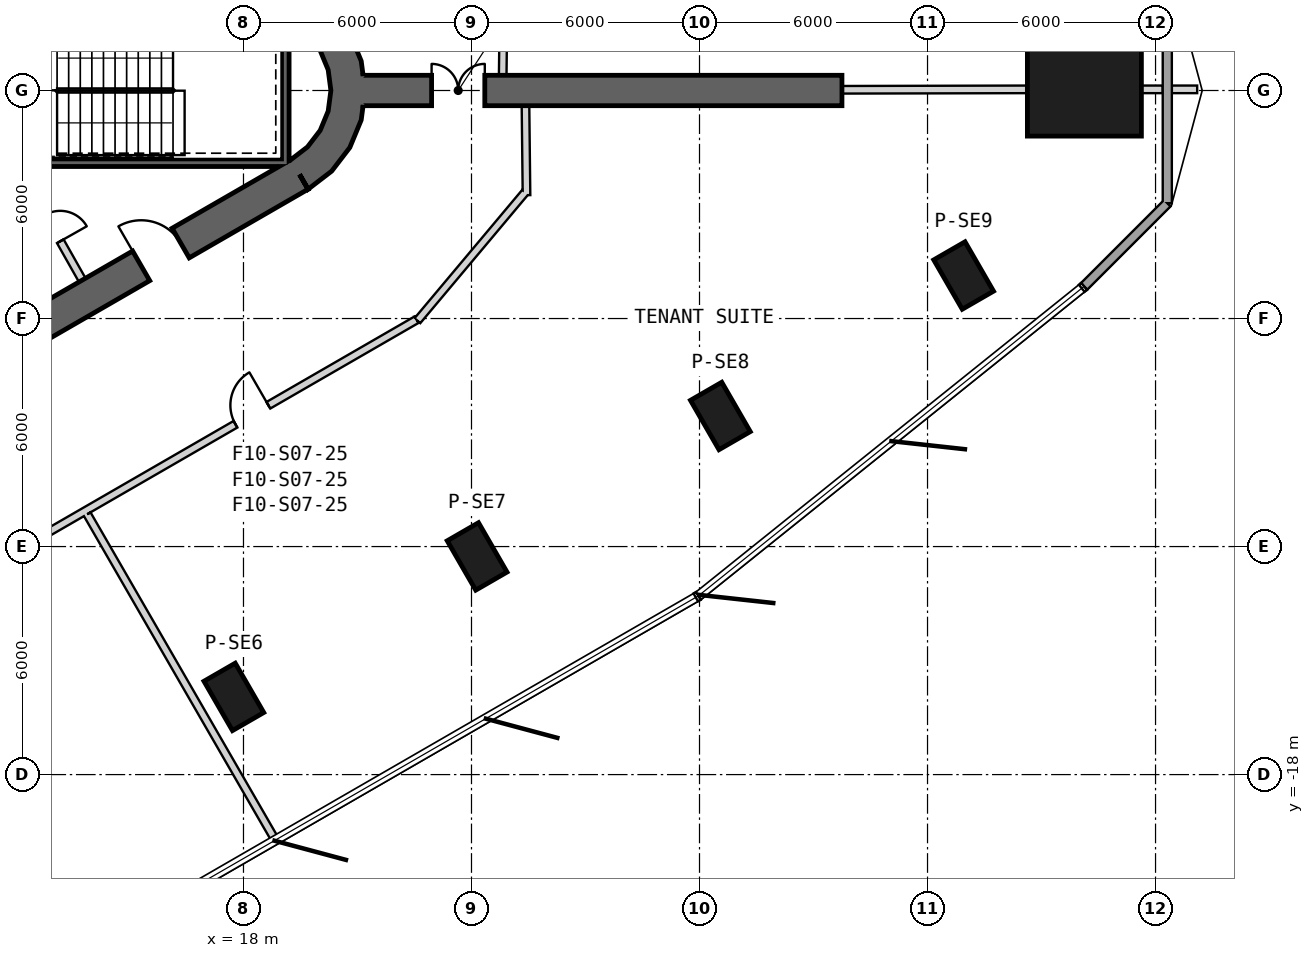
"""IFC4 building model, lengths in metres.
Left out: names, types, materials, properties, quantities, classifications, styles, units other than length and angle.
Written with IfcOpenShell. Run it as: python <this file> out.ifc"""

import sys

from ifc_helpers import new_model, si_unit, direction, frame, frame_2d, origin, origin_2d, place, context, subcontext, project, spatial, polyline, rectangle, outline, extrude, element, fill, save


model = new_model("IFC4")
c1 = context("Model", 3, precision=1e-05, world=origin(), true_north=direction((0.0, 1.0)))
c2 = subcontext(c1, "Body", "Model", "MODEL_VIEW")
j1 = project(units=[si_unit("LENGTHUNIT", "METRE"), si_unit("PLANEANGLEUNIT", "RADIAN")], contexts=[c1])
p1 = place(None, origin())
s1 = spatial("IfcSite", under=j1, at=p1, CompositionType="ELEMENT")
p2 = place(p1, origin())
s2 = spatial("IfcBuilding", under=s1, at=p2, CompositionType="ELEMENT")
p3 = place(p2, frame((0.0, 0.0, 131.6)))
s3 = spatial("IfcBuildingStorey", under=s2, at=p3, CompositionType="ELEMENT", Elevation=131.6)
p4 = place(p3, frame((40.128, 0.0, 0.0), z_axis=(0.0, 0.0, 1.0), x_axis=(1.0, 0.0, 0.0)))
e1 = element("IfcColumn", 1, at=p4, inside=s3, PredefinedType="COLUMN", context=c2, shape_type="SweptSolid", body=[
    extrude(rectangle(XDim=3.0, YDim=2.4, at=origin_2d()), origin(), (0.0, 0.0, 1.0), 4.1),
])
for number, where, z_axis, x_axis in (
    (2, (17.747, -15.956, 0.0), (0.0, 0.0, 1.0), (0.5, -0.866, 0.0)),
    (3, (24.148, -12.26, 0.0), (0.0, 0.0, 1.0), (0.5, -0.866, 0.0)),
    (4, (30.549, -8.564, 0.0), (0.0, 0.0, 1.0), (0.5, -0.866, 0.0)),
    (5, (36.95, -4.868, 0.0), (0.0, 0.0, 1.0), (0.5, -0.866, 0.0)),
):
    element("IfcColumn", number, at=place(p3, frame(where, z_axis=z_axis, x_axis=x_axis)), inside=s3, PredefinedType="COLUMN", context=c2, shape_type="SweptSolid", body=[
        extrude(rectangle(XDim=1.5, YDim=0.95, at=origin_2d()), origin(), (0.0, 0.0, 1.0), 4.1),
    ])
p5 = place(p3, frame((-7.825, -17.97, 0.0), z_axis=(0.0, 0.0, 1.0), x_axis=(0.866028369851, 0.499994862586, 0.0)))
e6 = element("IfcWall", 6, at=p5, inside=s3, PredefinedType="SHEAR", context=c2, shape_type="SweptSolid", body=[
    extrude(rectangle(XDim=31.523, YDim=0.9, at=frame_2d((15.762, 0.0))), origin(), (0.0, 0.0, 1.0), 4.1),
])
p6 = place(p5, frame((7.062, 0.0, 0.0)))
e7 = element("IfcOpeningElement", 7, at=p6, cuts=e6, PredefinedType="OPENING", context=c2, shape_type="SweptSolid", body=[
    extrude(rectangle(XDim=1.2, YDim=2.4, at=frame_2d((0.6, 1.2))), frame((0.0, 0.46, 0.0), z_axis=(0.0, -1.0, 0.0), x_axis=(1.0, 0.0, 0.0)), (0.0, 0.0, 1.0), 0.92),
])
p7 = place(p5, frame((9.762, 0.0, 0.0)))
e8 = element("IfcOpeningElement", 8, at=p7, cuts=e6, PredefinedType="OPENING", context=c2, shape_type="SweptSolid", body=[
    extrude(rectangle(XDim=1.2, YDim=2.4, at=frame_2d((0.6, 1.2))), frame((0.0, 0.46, 0.0), z_axis=(0.0, -1.0, 0.0), x_axis=(1.0, 0.0, 0.0)), (0.0, 0.0, 1.0), 0.92),
])
p8 = place(p5, frame((12.462, 0.0, 0.0)))
e9 = element("IfcOpeningElement", 9, at=p8, cuts=e6, PredefinedType="OPENING", context=c2, shape_type="SweptSolid", body=[
    extrude(rectangle(XDim=1.2, YDim=2.4, at=frame_2d((0.6, 1.2))), frame((0.0, 0.46, 0.0), z_axis=(0.0, -1.0, 0.0), x_axis=(1.0, 0.0, 0.0)), (0.0, 0.0, 1.0), 0.92),
])
p9 = place(p5, frame((15.162, 0.0, 0.0)))
e10 = element("IfcOpeningElement", 10, at=p9, cuts=e6, PredefinedType="OPENING", context=c2, shape_type="SweptSolid", body=[
    extrude(rectangle(XDim=1.2, YDim=2.4, at=frame_2d((0.6, 1.2))), frame((0.0, 0.46, 0.0), z_axis=(0.0, -1.0, 0.0), x_axis=(1.0, 0.0, 0.0)), (0.0, 0.0, 1.0), 0.92),
])
p10 = place(p5, frame((17.862, 0.0, 0.0)))
e11 = element("IfcOpeningElement", 11, at=p10, cuts=e6, PredefinedType="OPENING", context=c2, shape_type="SweptSolid", body=[
    extrude(rectangle(XDim=1.2, YDim=2.4, at=frame_2d((0.6, 1.2))), frame((0.0, 0.46, 0.0), z_axis=(0.0, -1.0, 0.0), x_axis=(1.0, 0.0, 0.0)), (0.0, 0.0, 1.0), 0.92),
])
p11 = place(p5, frame((20.562, 0.0, 0.0)))
e12 = element("IfcOpeningElement", 12, at=p11, cuts=e6, PredefinedType="OPENING", context=c2, shape_type="SweptSolid", body=[
    extrude(rectangle(XDim=1.2, YDim=2.4, at=frame_2d((0.6, 1.2))), frame((0.0, 0.46, 0.0), z_axis=(0.0, -1.0, 0.0), x_axis=(1.0, 0.0, 0.0)), (0.0, 0.0, 1.0), 0.92),
])
p12 = place(p5, frame((26.712, 0.0, 0.0)))
e13 = element("IfcOpeningElement", 13, at=p12, cuts=e6, PredefinedType="OPENING", context=c2, shape_type="SweptSolid", body=[
    extrude(rectangle(XDim=1.2, YDim=2.4, at=frame_2d((0.6, 1.2))), frame((0.0, 0.46, 0.0), z_axis=(0.0, -1.0, 0.0), x_axis=(1.0, 0.0, 0.0)), (0.0, 0.0, 1.0), 0.92),
])
p13 = place(p5, frame((3.612, 0.0, 0.0)))
e14 = element("IfcOpeningElement", 14, at=p13, cuts=e6, PredefinedType="OPENING", context=c2, shape_type="SweptSolid", body=[
    extrude(rectangle(XDim=1.2, YDim=2.4, at=frame_2d((0.6, 1.2))), frame((0.0, 0.46, 0.0), z_axis=(0.0, -1.0, 0.0), x_axis=(1.0, 0.0, 0.0)), (0.0, 0.0, 1.0), 0.92),
])
p14 = place(p3, origin())
e15 = element("IfcWall", 15, at=p14, inside=s3, PredefinedType="SHEAR", context=c2, shape_type="SweptSolid", body=[
    extrude(outline(polyline([(19.7, -2.598), (20.321, -2.121), (20.798, -1.5), (21.098, -0.777), (21.2, 0.0), (21.098, 0.777), (20.798, 1.5), (20.321, 2.121), (19.7, 2.598), (19.25, 1.819), (19.685, 1.485), (20.019, 1.05), (20.229, 0.543), (20.3, 0.0), (20.229, -0.543), (20.019, -1.05), (19.685, -1.485), (19.25, -1.819), (19.7, -2.598)])), origin(), (0.0, 0.0, 1.0), 4.1),
])
p15 = place(p3, frame((21.15, 0.0, 0.0), z_axis=(0.0, 0.0, 1.0), x_axis=(1.0, 0.0, 0.0)))
e16 = element("IfcWall", 16, at=p15, inside=s3, PredefinedType="SHEAR", context=c2, shape_type="SweptSolid", body=[
    extrude(rectangle(XDim=12.598, YDim=0.8, at=frame_2d((6.299, 0.0))), origin(), (0.0, 0.0, 1.0), 4.1),
])
p16 = place(p15, frame((1.8, 0.0, 0.0)))
e17 = element("IfcOpeningElement", 17, at=p16, cuts=e16, PredefinedType="OPENING", context=c2, shape_type="SweptSolid", body=[
    extrude(rectangle(XDim=1.4, YDim=2.4, at=frame_2d((0.7, 1.2))), frame((0.0, 0.41, 0.0), z_axis=(0.0, -1.0, 0.0), x_axis=(1.0, 0.0, 0.0)), (0.0, 0.0, 1.0), 0.82),
])
p17 = place(p3, frame((40.12, -5.154, 0.0), z_axis=(0.0, 0.0, 1.0), x_axis=(0.707146214964, 0.70706734521, 0.0)))
e18 = element("IfcWall", 18, at=p17, inside=s3, PredefinedType="SOLIDWALL", context=c2, shape_type="SweptSolid", body=[
    extrude(rectangle(XDim=3.095, YDim=0.24, at=frame_2d((1.548, 0.0))), origin(), (0.0, 0.0, 1.0), 3.8),
])
p18 = place(p3, frame((42.309, -2.965, 0.0), z_axis=(0.0, 0.0, 1.0), x_axis=(0.0, 1.0, 0.0)))
e19 = element("IfcWall", 19, at=p18, inside=s3, PredefinedType="SOLIDWALL", context=c2, shape_type="SweptSolid", body=[
    extrude(rectangle(XDim=5.931, YDim=0.24, at=frame_2d((2.965, 0.0))), origin(), (0.0, 0.0, 1.0), 3.8),
])
p19 = place(p3, frame((19.1, -2.0, -0.3), z_axis=(0.0, 0.0, 1.0), x_axis=(0.0, 1.0, 0.0)))
e20 = element("IfcWall", 20, at=p19, inside=s3, PredefinedType="SHEAR", context=c2, shape_type="SweptSolid", body=[
    extrude(rectangle(XDim=3.8, YDim=0.2, at=frame_2d((1.9, 0.0))), origin(), (0.0, 0.0, 1.0), 4.1),
])
p20 = place(p3, frame((11.1, -1.9, -0.3), z_axis=(0.0, 0.0, 1.0), x_axis=(1.0, 0.0, 0.0)))
e21 = element("IfcWall", 21, at=p20, inside=s3, PredefinedType="SHEAR", context=c2, shape_type="SweptSolid", body=[
    extrude(rectangle(XDim=7.9, YDim=0.2, at=frame_2d((3.95, 0.0))), origin(), (0.0, 0.0, 1.0), 4.1),
])
p21 = place(p3, frame((13.758, -4.99, 0.0), z_axis=(0.0, 0.0, 1.0), x_axis=(-0.491993409184, 0.87059892334, 0.0)))
e22 = element("IfcWall", 22, at=p21, inside=s3, PredefinedType="PARTITIONING", context=c2, shape_type="SweptSolid", body=[
    extrude(rectangle(XDim=3.15, YDim=0.2, at=frame_2d((1.575, 0.0))), origin(), (0.0, 0.0, 1.0), 3.8),
])
p22 = place(p21, frame((1.175, 0.0, 0.0)))
e23 = element("IfcOpeningElement", 23, at=p22, cuts=e22, PredefinedType="OPENING", context=c2, shape_type="SweptSolid", body=[
    extrude(rectangle(XDim=0.8, YDim=2.1, at=frame_2d((0.4, 1.05))), frame((0.0, 0.11, 0.0), z_axis=(0.0, -1.0, 0.0), x_axis=(1.0, 0.0, 0.0)), (0.0, 0.0, 1.0), 0.22),
])
p23 = place(p3, frame((24.821, 0.4, 0.0), z_axis=(0.0, 0.0, 1.0), x_axis=(0.01239062247, 0.999923233291, 0.0)))
e24 = element("IfcWall", 24, at=p23, inside=s3, PredefinedType="PARTITIONING", context=c2, shape_type="SweptSolid", body=[
    extrude(rectangle(XDim=1.97, YDim=0.2, at=frame_2d((0.985, 0.0))), origin(), (0.0, 0.0, 1.0), 3.8),
])
p24 = place(p3, frame((25.448, -2.754, 0.0), z_axis=(0.0, 0.0, 1.0), x_axis=(-0.011407679147, 0.999934930311, 0.0)))
e25 = element("IfcWall", 25, at=p24, inside=s3, PredefinedType="PARTITIONING", context=c2, shape_type="SweptSolid", body=[
    extrude(rectangle(XDim=2.354, YDim=0.2, at=frame_2d((1.177, 0.0))), origin(), (0.0, 0.0, 1.0), 3.8),
])
p25 = place(p3, frame((22.576, -6.058, 0.0), z_axis=(0.0, 0.0, 1.0), x_axis=(0.642769295272, 0.766059810364, 0.0)))
e26 = element("IfcWall", 26, at=p25, inside=s3, PredefinedType="PARTITIONING", context=c2, shape_type="SweptSolid", body=[
    extrude(rectangle(XDim=4.416, YDim=0.2, at=frame_2d((2.208, 0.0))), origin(), (0.0, 0.0, 1.0), 2.88),
])
p26 = place(p3, frame((-0.523, -19.354, 0.0), z_axis=(0.0, 0.0, 1.0), x_axis=(0.866024925705, 0.500000828058, 0.0)))
e27 = element("IfcWall", 27, at=p26, inside=s3, PredefinedType="PARTITIONING", context=c2, shape_type="SweptSolid", body=[
    extrude(rectangle(XDim=26.647, YDim=0.2, at=frame_2d((13.323, 0.0))), origin(), (0.0, 0.0, 1.0), 2.98),
])
p27 = place(p26, frame((21.145, 0.0, 0.0)))
e28 = element("IfcOpeningElement", 28, at=p27, cuts=e27, PredefinedType="OPENING", context=c2, shape_type="SweptSolid", body=[
    extrude(rectangle(XDim=1.0, YDim=2.1, at=frame_2d((0.5, 1.05))), frame((0.0, 0.11, 0.0), z_axis=(0.0, -1.0, 0.0), x_axis=(1.0, 0.0, 0.0)), (0.0, 0.0, 1.0), 0.22),
])
p28 = place(p26, frame((9.691, 0.0, 0.0)))
e29 = element("IfcOpeningElement", 29, at=p28, cuts=e27, PredefinedType="OPENING", context=c2, shape_type="SweptSolid", body=[
    extrude(rectangle(XDim=1.0, YDim=2.1, at=frame_2d((0.5, 1.05))), frame((0.0, 0.11, 0.0), z_axis=(0.0, -1.0, 0.0), x_axis=(1.0, 0.0, 0.0)), (0.0, 0.0, 1.0), 0.22),
])
p29 = place(p26, frame((1.369, 0.0, 0.0)))
e30 = element("IfcOpeningElement", 30, at=p29, cuts=e27, PredefinedType="OPENING", context=c2, shape_type="SweptSolid", body=[
    extrude(rectangle(XDim=1.0, YDim=2.1, at=frame_2d((0.5, 1.05))), frame((0.0, 0.11, 0.0), z_axis=(0.0, -1.0, 0.0), x_axis=(1.0, 0.0, 0.0)), (0.0, 0.0, 1.0), 0.22),
])
p30 = place(p3, frame((33.748, 0.019, 0.0), z_axis=(0.0, 0.0, 1.0), x_axis=(0.999997351569, 0.002301489877, 0.0)))
e31 = element("IfcWall", 31, at=p30, inside=s3, PredefinedType="PARTITIONING", context=c2, shape_type="SweptSolid", body=[
    extrude(rectangle(XDim=4.88, YDim=0.2, at=frame_2d((2.44, 0.0))), origin(), (0.0, 0.0, 1.0), 3.37),
])
p31 = place(p3, frame((41.628, 0.03, 0.0), z_axis=(0.0, 0.0, 1.0), x_axis=(1.0, 0.0, 0.0)))
e32 = element("IfcWall", 32, at=p31, inside=s3, PredefinedType="PARTITIONING", context=c2, shape_type="SweptSolid", body=[
    extrude(rectangle(XDim=0.561, YDim=0.2, at=frame_2d((0.281, 0.0))), origin(), (0.0, 0.0, 1.0), 3.8),
])
p32 = place(p3, frame((42.429, 0.03, 0.0), z_axis=(0.0, 0.0, 1.0), x_axis=(1.0, 0.0, 0.0)))
e33 = element("IfcWall", 33, at=p32, inside=s3, PredefinedType="PARTITIONING", context=c2, shape_type="SweptSolid", body=[
    extrude(rectangle(XDim=0.667, YDim=0.2, at=frame_2d((0.333, 0.0))), origin(), (0.0, 0.0, 1.0), 3.8),
])
p33 = place(p3, frame((13.888, -11.15, 0.0), z_axis=(0.0, 0.0, 1.0), x_axis=(0.499931641511, -0.86606486698, 0.0)))
e34 = element("IfcWall", 34, at=p33, inside=s3, PredefinedType="PARTITIONING", context=c2, shape_type="SweptSolid", body=[
    extrude(rectangle(XDim=9.901, YDim=0.2, at=frame_2d((4.95, 0.0))), origin(), (0.0, 0.0, 1.0), 3.08),
])
p34 = place(p22, origin())
e35 = element("IfcDoor", 35, at=p34, inside=s3, OperationType="SINGLE_SWING_LEFT", PredefinedType="USERDEFINED", context=c2, shape_type="SweptSolid", body=[
    extrude(rectangle(XDim=0.8, YDim=2.1, at=frame_2d((0.4, 1.05))), frame((0.0, 0.025, 0.0), z_axis=(0.0, -1.0, 0.0), x_axis=(1.0, 0.0, 0.0)), (0.0, 0.0, 1.0), 0.05),
])
fill(e23, e35)
p35 = place(p27, origin())
e36 = element("IfcDoor", 36, at=p35, inside=s3, OperationType="SINGLE_SWING_LEFT", PredefinedType="USERDEFINED", context=c2, shape_type="SweptSolid", body=[
    extrude(rectangle(XDim=1.0, YDim=2.1, at=frame_2d((0.5, 1.05))), frame((0.0, 0.025, 0.0), z_axis=(0.0, -1.0, 0.0), x_axis=(1.0, 0.0, 0.0)), (0.0, 0.0, 1.0), 0.05),
])
fill(e28, e36)
p36 = place(p12, origin())
e37 = element("IfcDoor", 37, at=p36, inside=s3, OperationType="SINGLE_SWING_RIGHT", PredefinedType="USERDEFINED", context=c2, shape_type="SweptSolid", body=[
    extrude(rectangle(XDim=1.2, YDim=2.4, at=frame_2d((0.6, 1.2))), frame((0.0, 0.025, 0.0), z_axis=(0.0, -1.0, 0.0), x_axis=(1.0, 0.0, 0.0)), (0.0, 0.0, 1.0), 0.05),
])
fill(e13, e37)
p37 = place(p16, origin())
e38 = element("IfcDoor", 38, at=p37, inside=s3, OperationType="DOUBLE_DOOR_SINGLE_SWING", PredefinedType="NOTDEFINED", context=c2, shape_type="SweptSolid", body=[
    extrude(rectangle(XDim=1.4, YDim=2.4, at=frame_2d((0.7, 1.2))), frame((0.0, 0.025, 0.0), z_axis=(0.0, -1.0, 0.0), x_axis=(1.0, 0.0, 0.0)), (0.0, 0.0, 1.0), 0.05),
])
fill(e17, e38)
save(model, sys.argv[1])
